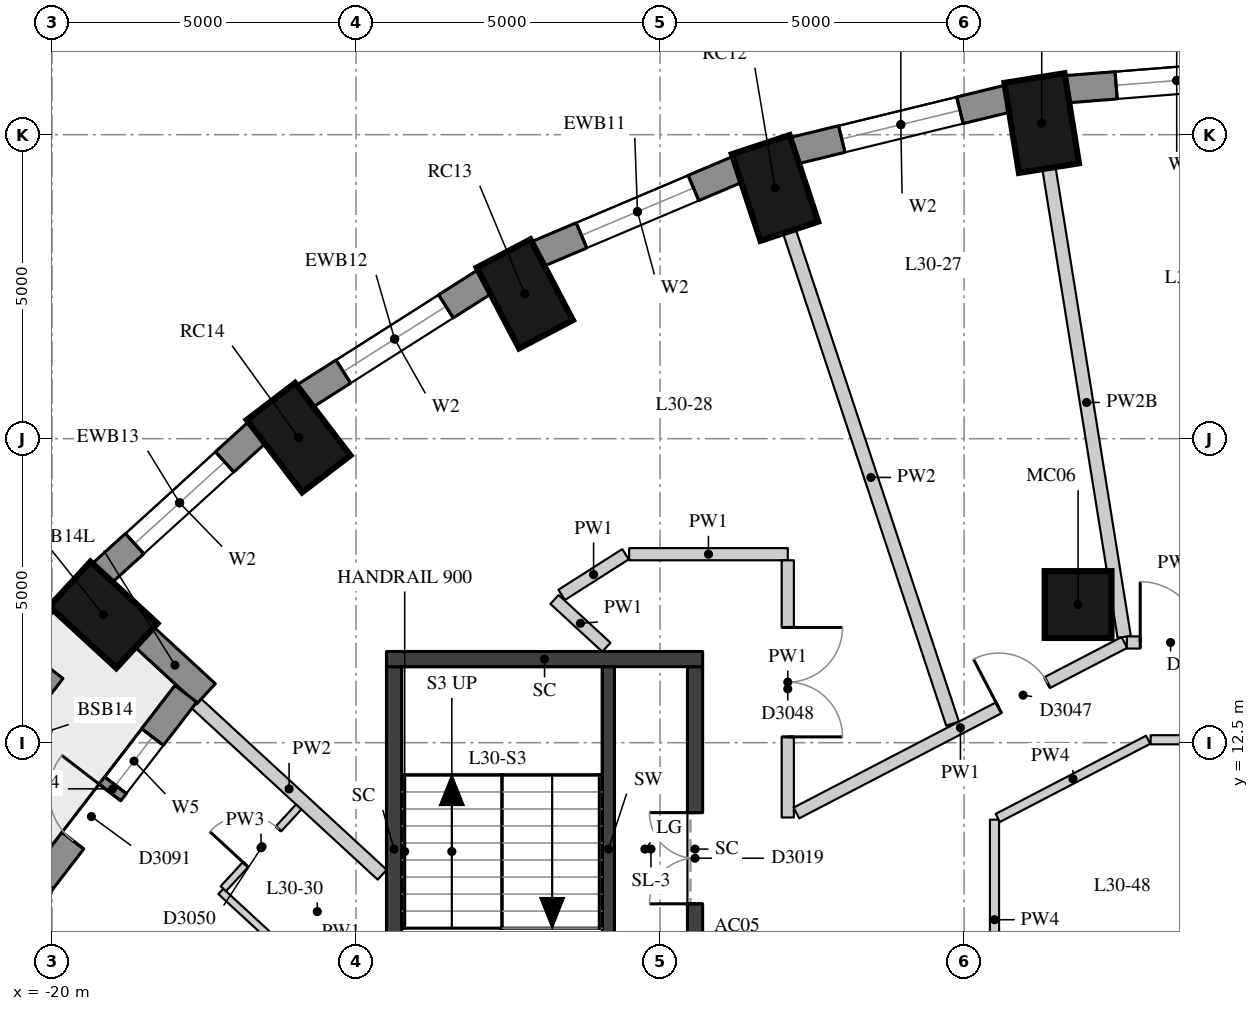
"""IFC4 building model, lengths in metres.
Left out: names, types, materials, properties, quantities, classifications, styles, units other than length and angle.
Written with IfcOpenShell. Run it as: python <this file> out.ifc"""

import sys

from ifc_helpers import new_model, si_unit, direction, frame, frame_2d, origin, origin_2d, place, context, subcontext, project, spatial, rectangle, extrude, element, fill, save


model = new_model("IFC4")
c1 = context("Model", 3, precision=1e-05, world=origin(), true_north=direction((0.0, 1.0)))
c2 = subcontext(c1, "Body", "Model", "MODEL_VIEW")
j1 = project(units=[si_unit("LENGTHUNIT", "METRE"), si_unit("PLANEANGLEUNIT", "RADIAN")], contexts=[c1])
p1 = place(None, origin())
s1 = spatial("IfcSite", under=j1, at=p1, CompositionType="ELEMENT")
p2 = place(p1, origin())
s2 = spatial("IfcBuilding", under=s1, at=p2, CompositionType="ELEMENT")
p3 = place(p2, frame((0.0, 0.0, 108.7)))
s3 = spatial("IfcBuildingStorey", under=s2, at=p3, CompositionType="ELEMENT", Elevation=108.7)
for number, where, z_axis, x_axis in (
    (1, (-3.724, 22.691, 0.0), (0.0, 0.0, 1.0), (-0.159, 0.987, 0.0)),
    (2, (-8.11, 21.624, 0.0), (0.0, 0.0, 1.0), (-0.315, 0.949, 0.0)),
    (3, (-12.225, 19.882, 0.0), (0.0, 0.0, 1.0), (-0.465, 0.885, 0.0)),
    (4, (-15.945, 17.517, 0.0), (0.0, 0.0, 1.0), (-0.607, 0.795, 0.0)),
    (5, (-19.156, 14.602, 0.0), (0.0, 0.0, 1.0), (-0.735, 0.678, 0.0)),
):
    element("IfcColumn", number, at=place(p3, frame(where, z_axis=z_axis, x_axis=x_axis)), inside=s3, PredefinedType="COLUMN", context=c2, shape_type="SweptSolid", body=[
        extrude(rectangle(XDim=1.5, YDim=1.0, at=origin_2d()), origin(), (0.0, 0.0, 1.0), 3.3),
    ])
p4 = place(p3, frame((-3.126, 14.772, 0.0), z_axis=(0.0, 0.0, 1.0), x_axis=(1.0, 0.0, 0.0)))
e6 = element("IfcColumn", 6, at=p4, inside=s3, PredefinedType="COLUMN", context=c2, shape_type="SweptSolid", body=[
    extrude(rectangle(XDim=1.1, YDim=1.1, at=origin_2d()), origin(), (0.0, 0.0, 1.0), 3.3),
])
p5 = place(p3, frame((0.32, 23.536, 0.0), z_axis=(0.0, 0.0, 1.0), x_axis=(-0.996862216754, -0.079156306178, 0.0)))
e7 = element("IfcWall", 7, at=p5, inside=s3, PredefinedType="SOLIDWALL", context=c2, shape_type="SweptSolid", body=[
    extrude(rectangle(XDim=3.658, YDim=0.45, at=frame_2d((1.829, 0.0))), origin(), (0.0, 0.0, 1.0), 3.02),
])
p6 = place(p5, frame((0.829, 0.0, 0.4)))
e8 = element("IfcOpeningElement", 8, at=p6, cuts=e7, PredefinedType="OPENING", context=c2, shape_type="SweptSolid", body=[
    extrude(rectangle(XDim=2.0, YDim=1.75, at=frame_2d((1.0, 0.875))), frame((0.0, 0.235, 0.0), z_axis=(0.0, -1.0, 0.0), x_axis=(1.0, 0.0, 0.0)), (0.0, 0.0, 1.0), 0.47),
])
p7 = place(p3, frame((-4.275, 23.094, 0.0), z_axis=(0.0, 0.0, 1.0), x_axis=(-0.971667603162, -0.236351579148, 0.0)))
e9 = element("IfcWall", 9, at=p7, inside=s3, PredefinedType="SOLIDWALL", context=c2, shape_type="SweptSolid", body=[
    extrude(rectangle(XDim=3.635, YDim=0.45, at=frame_2d((1.817, 0.0))), origin(), (0.0, 0.0, 1.0), 3.02),
])
p8 = place(p7, frame((0.817, 0.0, 0.4)))
e10 = element("IfcOpeningElement", 10, at=p8, cuts=e9, PredefinedType="OPENING", context=c2, shape_type="SweptSolid", body=[
    extrude(rectangle(XDim=2.0, YDim=1.75, at=frame_2d((1.0, 0.875))), frame((0.0, 0.235, 0.0), z_axis=(0.0, -1.0, 0.0), x_axis=(1.0, 0.0, 0.0)), (0.0, 0.0, 1.0), 0.47),
])
p9 = place(p3, frame((-8.718, 21.934, 0.0), z_axis=(0.0, 0.0, 1.0), x_axis=(-0.920879975612, -0.389846213932, 0.0)))
e11 = element("IfcWall", 11, at=p9, inside=s3, PredefinedType="SOLIDWALL", context=c2, shape_type="SweptSolid", body=[
    extrude(rectangle(XDim=3.592, YDim=0.45, at=frame_2d((1.796, 0.0))), origin(), (0.0, 0.0, 1.0), 3.02),
])
p10 = place(p9, frame((0.796, 0.0, 0.4)))
e12 = element("IfcOpeningElement", 12, at=p10, cuts=e11, PredefinedType="OPENING", context=c2, shape_type="SweptSolid", body=[
    extrude(rectangle(XDim=2.0, YDim=1.75, at=frame_2d((1.0, 0.875))), frame((0.0, 0.235, 0.0), z_axis=(0.0, -1.0, 0.0), x_axis=(1.0, 0.0, 0.0)), (0.0, 0.0, 1.0), 0.47),
])
p11 = place(p3, frame((-12.875, 20.087, 0.0), z_axis=(0.0, 0.0, 1.0), x_axis=(-0.843860651879, -0.536562391722, 0.0)))
e13 = element("IfcWall", 13, at=p11, inside=s3, PredefinedType="SOLIDWALL", context=c2, shape_type="SweptSolid", body=[
    extrude(rectangle(XDim=3.532, YDim=0.45, at=frame_2d((1.766, 0.0))), origin(), (0.0, 0.0, 1.0), 3.02),
])
p12 = place(p11, frame((0.766, 0.0, 0.4)))
e14 = element("IfcOpeningElement", 14, at=p12, cuts=e13, PredefinedType="OPENING", context=c2, shape_type="SweptSolid", body=[
    extrude(rectangle(XDim=2.0, YDim=1.75, at=frame_2d((1.0, 0.875))), frame((0.0, 0.235, 0.0), z_axis=(0.0, -1.0, 0.0), x_axis=(1.0, 0.0, 0.0)), (0.0, 0.0, 1.0), 0.47),
])
p13 = place(p3, frame((-16.62, 17.61, 0.0), z_axis=(0.0, 0.0, 1.0), x_axis=(-0.74032902847, -0.672244694739, 0.0)))
e15 = element("IfcWall", 15, at=p13, inside=s3, PredefinedType="SOLIDWALL", context=c2, shape_type="SweptSolid", body=[
    extrude(rectangle(XDim=3.464, YDim=0.45, at=frame_2d((1.732, 0.0))), origin(), (0.0, 0.0, 1.0), 3.02),
])
p14 = place(p13, frame((0.732, 0.0, 0.4)))
e16 = element("IfcOpeningElement", 16, at=p14, cuts=e15, PredefinedType="OPENING", context=c2, shape_type="SweptSolid", body=[
    extrude(rectangle(XDim=2.0, YDim=1.75, at=frame_2d((1.0, 0.875))), frame((0.0, 0.235, 0.0), z_axis=(0.0, -1.0, 0.0), x_axis=(1.0, 0.0, 0.0)), (0.0, 0.0, 1.0), 0.47),
])
p15 = place(p3, frame((-18.49, 14.247, 0.0), z_axis=(0.0, 0.0, 1.0), x_axis=(0.735307968822, -0.67773312667, 0.0)))
e17 = element("IfcWall", 17, at=p15, inside=s3, PredefinedType="SOLIDWALL", context=c2, shape_type="SweptSolid", body=[
    extrude(rectangle(XDim=1.391, YDim=0.45, at=frame_2d((0.695, 0.0))), origin(), (0.0, 0.0, 1.0), 3.02),
])
p16 = place(p3, frame((-17.799, 13.304, 0.0), z_axis=(0.0, 0.0, 1.0), x_axis=(-0.609698797728, -0.792633191362, 0.0)))
e18 = element("IfcWall", 18, at=p16, inside=s3, PredefinedType="SOLIDWALL", context=c2, shape_type="SweptSolid", body=[
    extrude(rectangle(XDim=3.945, YDim=0.45, at=frame_2d((1.973, 0.0))), origin(), (0.0, 0.0, 1.0), 3.02),
])
p17 = place(p16, frame((0.897, 0.0, 0.4)))
e19 = element("IfcOpeningElement", 19, at=p17, cuts=e18, PredefinedType="OPENING", context=c2, shape_type="SweptSolid", body=[
    extrude(rectangle(XDim=1.0, YDim=1.75, at=frame_2d((0.5, 0.875))), frame((0.0, 0.235, 0.0), z_axis=(0.0, -1.0, 0.0), x_axis=(1.0, 0.0, 0.0)), (0.0, 0.0, 1.0), 0.47),
])
p18 = place(p16, frame((2.047, 0.0, 0.0)))
e20 = element("IfcOpeningElement", 20, at=p18, cuts=e18, PredefinedType="OPENING", context=c2, shape_type="SweptSolid", body=[
    extrude(rectangle(XDim=1.0, YDim=2.15, at=frame_2d((0.5, 1.075))), frame((0.0, 0.235, 0.0), z_axis=(0.0, -1.0, 0.0), x_axis=(1.0, 0.0, 0.0)), (0.0, 0.0, 1.0), 0.47),
])
p19 = place(p3, frame((-20.182, 10.212, 0.0), z_axis=(0.0, 0.0, 1.0), x_axis=(-0.455932890657, -0.890014156751, 0.0)))
e21 = element("IfcWall", 21, at=p19, inside=s3, PredefinedType="SOLIDWALL", context=c2, shape_type="SweptSolid", body=[
    extrude(rectangle(XDim=3.888, YDim=0.45, at=frame_2d((1.944, 0.0))), origin(), (0.0, 0.0, 1.0), 3.02),
])
p20 = place(p19, frame((0.869, 0.0, 0.4)))
e22 = element("IfcOpeningElement", 22, at=p20, cuts=e21, PredefinedType="OPENING", context=c2, shape_type="SweptSolid", body=[
    extrude(rectangle(XDim=1.0, YDim=1.75, at=frame_2d((0.5, 0.875))), frame((0.0, 0.235, 0.0), z_axis=(0.0, -1.0, 0.0), x_axis=(1.0, 0.0, 0.0)), (0.0, 0.0, 1.0), 0.47),
])
p21 = place(p19, frame((2.019, 0.0, 0.0)))
e23 = element("IfcOpeningElement", 23, at=p21, cuts=e21, PredefinedType="OPENING", context=c2, shape_type="SweptSolid", body=[
    extrude(rectangle(XDim=1.0, YDim=2.15, at=frame_2d((0.5, 1.075))), frame((0.0, 0.235, 0.0), z_axis=(0.0, -1.0, 0.0), x_axis=(1.0, 0.0, 0.0)), (0.0, 0.0, 1.0), 0.47),
])
p22 = place(p3, frame((-20.096, 13.77, 0.0), z_axis=(0.0, 0.0, 1.0), x_axis=(-0.610752434717, -0.791821610899, 0.0)))
e24 = element("IfcWall", 24, at=p22, inside=s3, PredefinedType="USERDEFINED", context=c2, shape_type="SweptSolid", body=[
    extrude(rectangle(XDim=1.8, YDim=0.7, at=frame_2d((0.9, 0.0))), origin(), (0.0, 0.0, 1.0), 0.75),
])
p23 = place(p3, frame((-10.85, 7.75, 0.0), z_axis=(0.0, 0.0, 1.0), x_axis=(0.0, 1.0, 0.0)))
e25 = element("IfcWall", 25, at=p23, inside=s3, PredefinedType="SHEAR", context=c2, shape_type="SweptSolid", body=[
    extrude(rectangle(XDim=6.0, YDim=0.2, at=frame_2d((3.0, 0.0))), origin(), (0.0, 0.0, 1.0), 3.02),
])
p24 = place(p23, frame((0.1, 0.0, 0.0)))
e26 = element("IfcOpeningElement", 26, at=p24, cuts=e25, PredefinedType="OPENING", context=c2, shape_type="SweptSolid", body=[
    extrude(rectangle(XDim=1.5, YDim=2.1, at=frame_2d((0.75, 1.05))), frame((0.0, 0.11, 0.0), z_axis=(0.0, -1.0, 0.0), x_axis=(1.0, 0.0, 0.0)), (0.0, 0.0, 1.0), 0.22),
])
p25 = place(p3, frame((-14.375, 7.75, -0.28), z_axis=(0.0, 0.0, 1.0), x_axis=(0.0, 1.0, 0.0)))
e27 = element("IfcWall", 27, at=p25, inside=s3, PredefinedType="SHEAR", context=c2, shape_type="SweptSolid", body=[
    extrude(rectangle(XDim=6.0, YDim=0.25, at=frame_2d((3.0, 0.0))), origin(), (0.0, 0.0, 1.0), 3.3),
])
p26 = place(p3, frame((-9.425, 7.75, -0.28), z_axis=(0.0, 0.0, 1.0), x_axis=(0.0, 1.0, 0.0)))
e28 = element("IfcWall", 28, at=p26, inside=s3, PredefinedType="SHEAR", context=c2, shape_type="SweptSolid", body=[
    extrude(rectangle(XDim=6.0, YDim=0.25, at=frame_2d((3.0, 0.0))), origin(), (0.0, 0.0, 1.0), 3.3),
])
p27 = place(p26, frame((2.1, 0.0, 0.28)))
e29 = element("IfcOpeningElement", 29, at=p27, cuts=e28, PredefinedType="OPENING", context=c2, shape_type="SweptSolid", body=[
    extrude(rectangle(XDim=1.5, YDim=2.1, at=frame_2d((0.75, 1.05))), frame((0.0, 0.135, 0.0), z_axis=(0.0, -1.0, 0.0), x_axis=(1.0, 0.0, 0.0)), (0.0, 0.0, 1.0), 0.27),
])
p28 = place(p3, frame((-14.5, 13.875, -0.28), z_axis=(0.0, 0.0, 1.0), x_axis=(1.0, 0.0, 0.0)))
e30 = element("IfcWall", 30, at=p28, inside=s3, PredefinedType="SHEAR", context=c2, shape_type="SweptSolid", body=[
    extrude(rectangle(XDim=5.2, YDim=0.25, at=frame_2d((2.6, 0.0))), origin(), (0.0, 0.0, 1.0), 3.3),
])
p29 = place(p3, frame((-10.883, 14.07, 0.0), z_axis=(0.0, 0.0, 1.0), x_axis=(-0.735263405477, 0.677781472575, 0.0)))
e31 = element("IfcWall", 31, at=p29, inside=s3, PredefinedType="PARTITIONING", context=c2, shape_type="SweptSolid", body=[
    extrude(rectangle(XDim=1.159, YDim=0.2, at=frame_2d((0.58, 0.0))), origin(), (0.0, 0.0, 1.0), 3.02),
])
p30 = place(p3, frame((-11.618, 14.931, 0.0), z_axis=(0.0, 0.0, 1.0), x_axis=(0.84322497481, 0.537560826193, 0.0)))
e32 = element("IfcWall", 32, at=p30, inside=s3, PredefinedType="PARTITIONING", context=c2, shape_type="SweptSolid", body=[
    extrude(rectangle(XDim=1.244, YDim=0.2, at=frame_2d((0.622, 0.0))), origin(), (0.0, 0.0, 1.0), 3.02),
])
p31 = place(p3, frame((-10.509, 15.6, 0.0), z_axis=(0.0, 0.0, 1.0), x_axis=(1.0, 0.0, 0.0)))
e33 = element("IfcWall", 33, at=p31, inside=s3, PredefinedType="PARTITIONING", context=c2, shape_type="SweptSolid", body=[
    extrude(rectangle(XDim=2.609, YDim=0.2, at=frame_2d((1.304, 0.0))), origin(), (0.0, 0.0, 1.0), 3.02),
])
p32 = place(p3, frame((-7.9, 15.5, 0.0), z_axis=(0.0, 0.0, 1.0), x_axis=(0.0, -1.0, 0.0)))
e34 = element("IfcWall", 34, at=p32, inside=s3, PredefinedType="PARTITIONING", context=c2, shape_type="SweptSolid", body=[
    extrude(rectangle(XDim=4.23, YDim=0.2, at=frame_2d((2.115, 0.0))), origin(), (0.0, 0.0, 1.0), 3.02),
])
p33 = place(p32, frame((1.104, 0.0, 0.0)))
e35 = element("IfcOpeningElement", 35, at=p33, cuts=e34, PredefinedType="OPENING", context=c2, shape_type="SweptSolid", body=[
    extrude(rectangle(XDim=1.8, YDim=2.1, at=frame_2d((0.9, 1.05))), frame((0.0, 0.11, 0.0), z_axis=(0.0, -1.0, 0.0), x_axis=(1.0, 0.0, 0.0)), (0.0, 0.0, 1.0), 0.22),
])
p34 = place(p3, frame((-7.757, 11.344, 0.0), z_axis=(0.0, 0.0, 1.0), x_axis=(0.887263483993, 0.461262951008, 0.0)))
e36 = element("IfcWall", 36, at=p34, inside=s3, PredefinedType="PARTITIONING", context=c2, shape_type="SweptSolid", body=[
    extrude(rectangle(XDim=6.079, YDim=0.2, at=frame_2d((3.04, 0.0))), origin(), (0.0, 0.0, 1.0), 3.02),
])
p35 = place(p34, frame((3.75, 0.0, 0.0)))
e37 = element("IfcOpeningElement", 37, at=p35, cuts=e36, PredefinedType="OPENING", context=c2, shape_type="SweptSolid", body=[
    extrude(rectangle(XDim=0.9, YDim=2.1, at=frame_2d((0.45, 1.05))), frame((0.0, 0.11, 0.0), z_axis=(0.0, -1.0, 0.0), x_axis=(1.0, 0.0, 0.0)), (0.0, 0.0, 1.0), 0.22),
])
p36 = place(p3, frame((-2.324, 14.148, 0.0), z_axis=(0.0, 0.0, 1.0), x_axis=(1.0, 0.0, 0.0)))
e38 = element("IfcWall", 38, at=p36, inside=s3, PredefinedType="PARTITIONING", context=c2, shape_type="SweptSolid", body=[
    extrude(rectangle(XDim=6.288, YDim=0.2, at=frame_2d((3.144, 0.0))), origin(), (0.0, 0.0, 1.0), 3.02),
])
p37 = place(p36, frame((3.617, 0.0, 0.0)))
e39 = element("IfcOpeningElement", 39, at=p37, cuts=e38, PredefinedType="OPENING", context=c2, shape_type="SweptSolid", body=[
    extrude(rectangle(XDim=0.9, YDim=2.1, at=frame_2d((0.45, 1.05))), frame((0.0, 0.11, 0.0), z_axis=(0.0, -1.0, 0.0), x_axis=(1.0, 0.0, 0.0)), (0.0, 0.0, 1.0), 0.22),
])
p38 = place(p36, frame((0.22, 0.0, 0.0)))
e40 = element("IfcOpeningElement", 40, at=p38, cuts=e38, PredefinedType="OPENING", context=c2, shape_type="SweptSolid", body=[
    extrude(rectangle(XDim=1.0, YDim=2.1, at=frame_2d((0.5, 1.05))), frame((0.0, 0.11, 0.0), z_axis=(0.0, -1.0, 0.0), x_axis=(1.0, 0.0, 0.0)), (0.0, 0.0, 1.0), 0.22),
])
p39 = place(p3, frame((-4.5, 7.942, 0.0), z_axis=(0.0, 0.0, 1.0), x_axis=(0.0, 1.0, 0.0)))
e41 = element("IfcWall", 41, at=p39, inside=s3, PredefinedType="PARTITIONING", context=c2, shape_type="SweptSolid", body=[
    extrude(rectangle(XDim=3.292, YDim=0.15, at=frame_2d((1.646, 0.0))), origin(), (0.0, 0.0, 1.0), 3.02),
])
p40 = place(p3, frame((-4.447, 11.262, 0.0), z_axis=(0.0, 0.0, 1.0), x_axis=(0.887294207503, 0.461203847915, 0.0)))
e42 = element("IfcWall", 42, at=p40, inside=s3, PredefinedType="PARTITIONING", context=c2, shape_type="SweptSolid", body=[
    extrude(rectangle(XDim=2.788, YDim=0.15, at=frame_2d((1.394, 0.0))), origin(), (0.0, 0.0, 1.0), 3.02),
])
p41 = place(p3, frame((-1.933, 12.548, 0.0), z_axis=(0.0, 0.0, 1.0), x_axis=(1.0, 0.0, 0.0)))
e43 = element("IfcWall", 43, at=p41, inside=s3, PredefinedType="PARTITIONING", context=c2, shape_type="SweptSolid", body=[
    extrude(rectangle(XDim=2.653, YDim=0.15, at=frame_2d((1.326, 0.0))), origin(), (0.0, 0.0, 1.0), 3.02),
])
p42 = place(p3, frame((-3.605, 21.95, 0.0), z_axis=(0.0, 0.0, 1.0), x_axis=(0.158529499426, -0.987354241299, 0.0)))
e44 = element("IfcWall", 44, at=p42, inside=s3, PredefinedType="PARTITIONING", context=c2, shape_type="SweptSolid", body=[
    extrude(rectangle(XDim=7.808, YDim=0.22, at=frame_2d((3.904, 0.0))), origin(), (0.0, 0.0, 1.0), 2.57),
])
p43 = place(p3, frame((-7.874, 20.912, 0.0), z_axis=(0.0, 0.0, 1.0), x_axis=(0.314561749761, -0.949237012335, 0.0)))
e45 = element("IfcWall", 45, at=p43, inside=s3, PredefinedType="PARTITIONING", context=c2, shape_type="SweptSolid", body=[
    extrude(rectangle(XDim=8.531, YDim=0.22, at=frame_2d((4.266, 0.0))), origin(), (0.0, 0.0, 1.0), 3.02),
])
p44 = place(p3, frame((-17.633, 13.151, 0.0), z_axis=(0.0, 0.0, 1.0), x_axis=(0.73535370522, -0.677683501511, 0.0)))
e46 = element("IfcWall", 46, at=p44, inside=s3, PredefinedType="PARTITIONING", context=c2, shape_type="SweptSolid", body=[
    extrude(rectangle(XDim=4.166, YDim=0.22, at=frame_2d((2.083, 0.0))), origin(), (0.0, 0.0, 1.0), 3.02),
])
p45 = place(p3, frame((-15.387, 8.362, 0.0), z_axis=(0.0, 0.0, 1.0), x_axis=(-0.735313004993, 0.677727662626, 0.0)))
e47 = element("IfcWall", 47, at=p45, inside=s3, PredefinedType="PARTITIONING", context=c2, shape_type="SweptSolid", body=[
    extrude(rectangle(XDim=2.497, YDim=0.12, at=frame_2d((1.249, 0.0))), origin(), (0.0, 0.0, 1.0), 3.02),
])
p46 = place(p3, frame((-17.183, 10.098, 0.0), z_axis=(0.0, 0.0, 1.0), x_axis=(0.677631502542, 0.735401622763, 0.0)))
e48 = element("IfcWall", 48, at=p46, inside=s3, PredefinedType="PARTITIONING", context=c2, shape_type="SweptSolid", body=[
    extrude(rectangle(XDim=1.83, YDim=0.12, at=frame_2d((0.915, 0.0))), origin(), (0.0, 0.0, 1.0), 3.02),
])
p47 = place(p46, frame((0.54, 0.0, 0.0)))
e49 = element("IfcOpeningElement", 49, at=p47, cuts=e48, PredefinedType="OPENING", context=c2, shape_type="SweptSolid", body=[
    extrude(rectangle(XDim=0.8, YDim=2.1, at=frame_2d((0.4, 1.05))), frame((0.0, 0.07, 0.0), z_axis=(0.0, -1.0, 0.0), x_axis=(1.0, 0.0, 0.0)), (0.0, 0.0, 1.0), 0.14),
])
p48 = place(p6, origin())
e50 = element("IfcWindow", 50, at=p48, inside=s3, PartitioningType="SINGLE_PANEL", PredefinedType="WINDOW", context=c2, shape_type="SweptSolid", body=[
    extrude(rectangle(XDim=2.0, YDim=1.75, at=frame_2d((1.0, 0.875))), frame((0.0, 0.035, 0.0), z_axis=(0.0, -1.0, 0.0), x_axis=(1.0, 0.0, 0.0)), (0.0, 0.0, 1.0), 0.06),
])
fill(e8, e50)
p49 = place(p8, origin())
e51 = element("IfcWindow", 51, at=p49, inside=s3, PartitioningType="SINGLE_PANEL", PredefinedType="WINDOW", context=c2, shape_type="SweptSolid", body=[
    extrude(rectangle(XDim=2.0, YDim=1.75, at=frame_2d((1.0, 0.875))), frame((0.0, 0.035, 0.0), z_axis=(0.0, -1.0, 0.0), x_axis=(1.0, 0.0, 0.0)), (0.0, 0.0, 1.0), 0.06),
])
fill(e10, e51)
p50 = place(p10, origin())
e52 = element("IfcWindow", 52, at=p50, inside=s3, PartitioningType="SINGLE_PANEL", PredefinedType="WINDOW", context=c2, shape_type="SweptSolid", body=[
    extrude(rectangle(XDim=2.0, YDim=1.75, at=frame_2d((1.0, 0.875))), frame((0.0, 0.035, 0.0), z_axis=(0.0, -1.0, 0.0), x_axis=(1.0, 0.0, 0.0)), (0.0, 0.0, 1.0), 0.06),
])
fill(e12, e52)
p51 = place(p12, origin())
e53 = element("IfcWindow", 53, at=p51, inside=s3, PartitioningType="SINGLE_PANEL", PredefinedType="WINDOW", context=c2, shape_type="SweptSolid", body=[
    extrude(rectangle(XDim=2.0, YDim=1.75, at=frame_2d((1.0, 0.875))), frame((0.0, 0.035, 0.0), z_axis=(0.0, -1.0, 0.0), x_axis=(1.0, 0.0, 0.0)), (0.0, 0.0, 1.0), 0.06),
])
fill(e14, e53)
p52 = place(p14, origin())
e54 = element("IfcWindow", 54, at=p52, inside=s3, PartitioningType="SINGLE_PANEL", PredefinedType="WINDOW", context=c2, shape_type="SweptSolid", body=[
    extrude(rectangle(XDim=2.0, YDim=1.75, at=frame_2d((1.0, 0.875))), frame((0.0, 0.035, 0.0), z_axis=(0.0, -1.0, 0.0), x_axis=(1.0, 0.0, 0.0)), (0.0, 0.0, 1.0), 0.06),
])
fill(e16, e54)
p53 = place(p17, origin())
e55 = element("IfcWindow", 55, at=p53, inside=s3, PartitioningType="SINGLE_PANEL", PredefinedType="WINDOW", context=c2, shape_type="SweptSolid", body=[
    extrude(rectangle(XDim=1.0, YDim=1.75, at=frame_2d((0.5, 0.875))), frame((0.0, 0.035, 0.0), z_axis=(0.0, -1.0, 0.0), x_axis=(1.0, 0.0, 0.0)), (0.0, 0.0, 1.0), 0.06),
])
fill(e19, e55)
p54 = place(p18, frame((1.0, 0.0, 0.0), z_axis=(0.0, 0.0, 1.0), x_axis=(-1.0, 0.0, 0.0)))
e56 = element("IfcDoor", 56, at=p54, inside=s3, OperationType="SINGLE_SWING_RIGHT", PredefinedType="DOOR", context=c2, shape_type="SweptSolid", body=[
    extrude(rectangle(XDim=1.0, YDim=2.15, at=frame_2d((0.5, 1.075))), frame((0.0, 0.075, 0.0), z_axis=(0.0, -1.0, 0.0), x_axis=(1.0, 0.0, 0.0)), (0.0, 0.0, 1.0), 0.05),
])
fill(e20, e56)
p55 = place(p27, origin())
e57 = element("IfcDoor", 57, at=p55, inside=s3, OperationType="DOUBLE_DOOR_SINGLE_SWING", PredefinedType="DOOR", context=c2, shape_type="SweptSolid", body=[
    extrude(rectangle(XDim=1.5, YDim=2.1, at=frame_2d((0.75, 1.05))), frame((0.0, 0.025, 0.0), z_axis=(0.0, -1.0, 0.0), x_axis=(1.0, 0.0, 0.0)), (0.0, 0.0, 1.0), 0.05),
])
fill(e29, e57)
p56 = place(p38, origin())
e58 = element("IfcDoor", 58, at=p56, inside=s3, OperationType="SINGLE_SWING_LEFT", PredefinedType="DOOR", context=c2, shape_type="SweptSolid", body=[
    extrude(rectangle(XDim=1.0, YDim=2.1, at=frame_2d((0.5, 1.05))), frame((0.0, 0.025, 0.0), z_axis=(0.0, -1.0, 0.0), x_axis=(1.0, 0.0, 0.0)), (0.0, 0.0, 1.0), 0.05),
])
fill(e40, e58)
p57 = place(p35, origin())
e59 = element("IfcDoor", 59, at=p57, inside=s3, OperationType="SINGLE_SWING_LEFT", PredefinedType="DOOR", context=c2, shape_type="SweptSolid", body=[
    extrude(rectangle(XDim=0.9, YDim=2.1, at=frame_2d((0.45, 1.05))), frame((0.0, 0.025, 0.0), z_axis=(0.0, -1.0, 0.0), x_axis=(1.0, 0.0, 0.0)), (0.0, 0.0, 1.0), 0.05),
])
fill(e37, e59)
p58 = place(p33, origin())
e60 = element("IfcDoor", 60, at=p58, inside=s3, OperationType="DOUBLE_DOOR_SINGLE_SWING", PredefinedType="DOOR", context=c2, shape_type="SweptSolid", body=[
    extrude(rectangle(XDim=1.8, YDim=2.1, at=frame_2d((0.9, 1.05))), frame((0.0, 0.025, 0.0), z_axis=(0.0, -1.0, 0.0), x_axis=(1.0, 0.0, 0.0)), (0.0, 0.0, 1.0), 0.05),
])
fill(e35, e60)
p59 = place(p47, origin())
e61 = element("IfcDoor", 61, at=p59, inside=s3, OperationType="SINGLE_SWING_LEFT", PredefinedType="DOOR", context=c2, shape_type="SweptSolid", body=[
    extrude(rectangle(XDim=0.8, YDim=2.1, at=frame_2d((0.4, 1.05))), frame((0.0, 0.025, 0.0), z_axis=(0.0, -1.0, 0.0), x_axis=(1.0, 0.0, 0.0)), (0.0, 0.0, 1.0), 0.05),
])
fill(e49, e61)
save(model, sys.argv[1])
